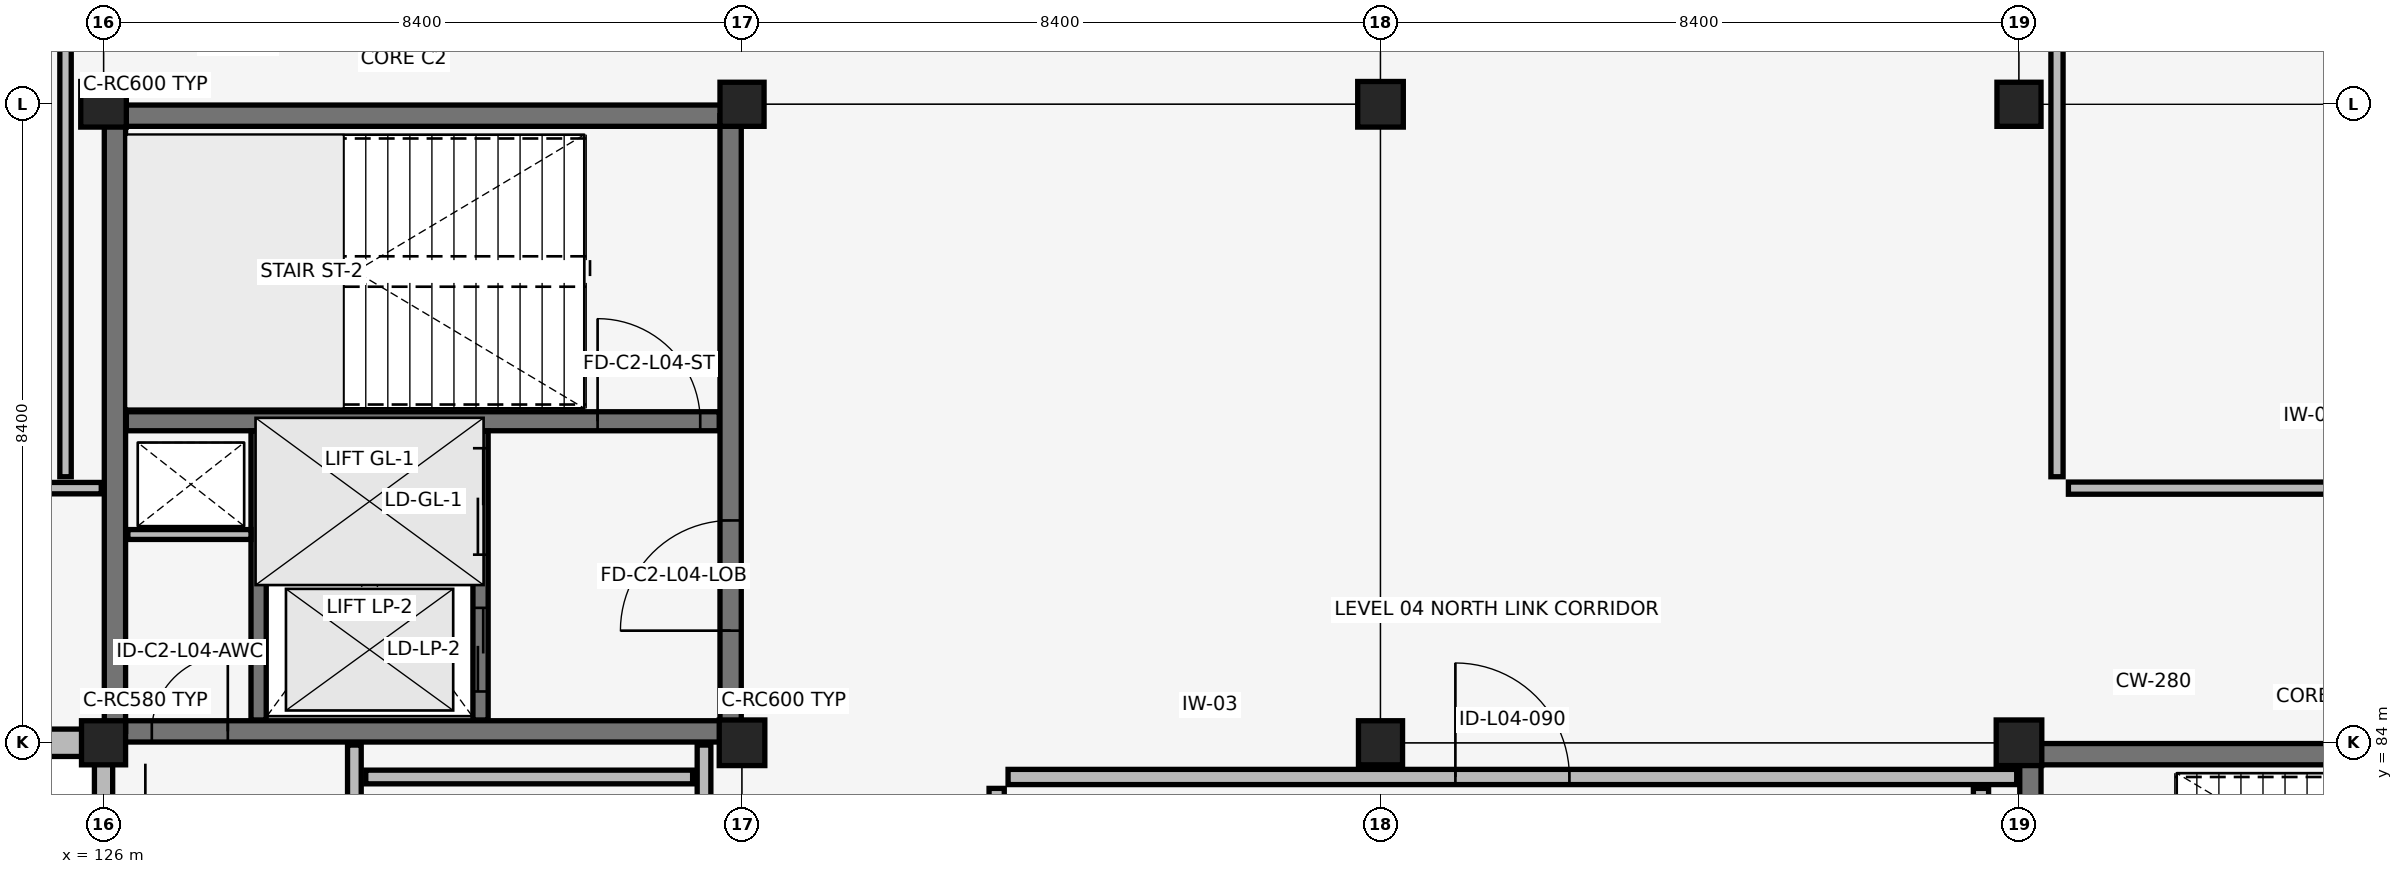
"""IFC4 building model, lengths in metres.
Left out: names, types, materials, properties, quantities, classifications, styles, units other than length and angle.
Written with IfcOpenShell. Run it as: python <this file> out.ifc"""

import sys

from ifc_helpers import new_model, si_unit, direction, frame, frame_2d, origin, origin_2d, place, context, subcontext, project, spatial, rectangle, extrude, element, fill, save


model = new_model("IFC4")
c1 = context("Model", 3, precision=1e-05, world=origin(), true_north=direction((0.0, 1.0)))
c2 = subcontext(c1, "Body", "Model", "MODEL_VIEW")
j1 = project(units=[si_unit("LENGTHUNIT", "METRE"), si_unit("PLANEANGLEUNIT", "RADIAN")], contexts=[c1])
p1 = place(None, origin())
s1 = spatial("IfcSite", under=j1, at=p1, CompositionType="ELEMENT")
p2 = place(p1, origin())
s2 = spatial("IfcBuilding", under=s1, at=p2, CompositionType="ELEMENT")
p3 = place(p2, frame((0.0, 0.0, 18.02)))
s3 = spatial("IfcBuildingStorey", under=s2, at=p3, CompositionType="ELEMENT", Elevation=18.02)
p4 = place(p3, frame((126.15, 84.15, 0.0), z_axis=(0.0, 0.0, 1.0), x_axis=(1.0, 0.0, 0.0)))
e1 = element("IfcWall", 1, at=p4, inside=s3, PredefinedType="SHEAR", context=c2, shape_type="SweptSolid", body=[
    extrude(rectangle(XDim=8.1, YDim=0.28, at=frame_2d((4.05, 0.0))), origin(), (0.0, 0.0, 1.0), 3.78),
])
p5 = place(p4, frame((0.485, 0.0, 0.0)))
e2 = element("IfcOpeningElement", 2, at=p5, cuts=e1, PredefinedType="OPENING", context=c2, shape_type="SweptSolid", body=[
    extrude(rectangle(XDim=1.0, YDim=2.15, at=frame_2d((0.5, 1.075))), frame((0.0, 0.15, 0.0), z_axis=(0.0, -1.0, 0.0), x_axis=(1.0, 0.0, 0.0)), (0.0, 0.0, 1.0), 0.3),
])
for number, where, z_axis, x_axis in (
    (3, (126.15, 92.25, 0.0), (0.0, 0.0, 1.0), (1.0, 0.0, 0.0)),
    (4, (126.15, 84.15, 0.0), (0.0, 0.0, 1.0), (0.0, 1.0, 0.0)),
):
    element("IfcWall", number, at=place(p3, frame(where, z_axis=z_axis, x_axis=x_axis)), inside=s3, PredefinedType="SHEAR", context=c2, shape_type="SweptSolid", body=[
        extrude(rectangle(XDim=8.1, YDim=0.28, at=frame_2d((4.05, 0.0))), origin(), (0.0, 0.0, 1.0), 3.78),
    ])
p6 = place(p3, frame((134.25, 84.15, 0.0), z_axis=(0.0, 0.0, 1.0), x_axis=(0.0, 1.0, 0.0)))
e5 = element("IfcWall", 5, at=p6, inside=s3, PredefinedType="SHEAR", context=c2, shape_type="SweptSolid", body=[
    extrude(rectangle(XDim=8.1, YDim=0.28, at=frame_2d((4.05, 0.0))), origin(), (0.0, 0.0, 1.0), 3.78),
])
p7 = place(p6, frame((1.325, 0.0, 0.0)))
e6 = element("IfcOpeningElement", 6, at=p7, cuts=e5, PredefinedType="OPENING", context=c2, shape_type="SweptSolid", body=[
    extrude(rectangle(XDim=1.45, YDim=2.15, at=frame_2d((0.725, 1.075))), frame((0.0, 0.15, 0.0), z_axis=(0.0, -1.0, 0.0), x_axis=(1.0, 0.0, 0.0)), (0.0, 0.0, 1.0), 0.3),
])
p8 = place(p3, frame((126.3, 88.23, 0.0), z_axis=(0.0, 0.0, 1.0), x_axis=(1.0, 0.0, 0.0)))
e7 = element("IfcWall", 7, at=p8, inside=s3, PredefinedType="SHEAR", context=c2, shape_type="SweptSolid", body=[
    extrude(rectangle(XDim=7.8, YDim=0.25, at=frame_2d((3.9, 0.0))), origin(), (0.0, 0.0, 1.0), 3.78),
])
p9 = place(p8, frame((6.2, 0.0, 0.0)))
e8 = element("IfcOpeningElement", 8, at=p9, cuts=e7, PredefinedType="OPENING", context=c2, shape_type="SweptSolid", body=[
    extrude(rectangle(XDim=1.35, YDim=2.15, at=frame_2d((0.675, 1.075))), frame((0.0, 0.135, 0.0), z_axis=(0.0, -1.0, 0.0), x_axis=(1.0, 0.0, 0.0)), (0.0, 0.0, 1.0), 0.27),
])
p10 = place(p3, frame((151.35, 83.85, 0.0), z_axis=(0.0, 0.0, 1.0), x_axis=(1.0, 0.0, 0.0)))
e9 = element("IfcWall", 9, at=p10, inside=s3, PredefinedType="SHEAR", context=c2, shape_type="SweptSolid", body=[
    extrude(rectangle(XDim=8.1, YDim=0.28, at=frame_2d((4.05, 0.0))), origin(), (0.0, 0.0, 1.0), 3.78),
])
p11 = place(p3, frame((151.35, 75.75, 0.0), z_axis=(0.0, 0.0, 1.0), x_axis=(0.0, 1.0, 0.0)))
e10 = element("IfcWall", 10, at=p11, inside=s3, PredefinedType="SHEAR", context=c2, shape_type="SweptSolid", body=[
    extrude(rectangle(XDim=8.1, YDim=0.28, at=frame_2d((4.05, 0.0))), origin(), (0.0, 0.0, 1.0), 3.78),
])
p12 = place(p11, frame((1.325, 0.0, 0.0)))
e11 = element("IfcOpeningElement", 11, at=p12, cuts=e10, PredefinedType="OPENING", context=c2, shape_type="SweptSolid", body=[
    extrude(rectangle(XDim=1.45, YDim=2.15, at=frame_2d((0.725, 1.075))), frame((0.0, 0.15, 0.0), z_axis=(0.0, -1.0, 0.0), x_axis=(1.0, 0.0, 0.0)), (0.0, 0.0, 1.0), 0.3),
])
p13 = place(p3, frame((126.0, 84.0, 0.0), z_axis=(0.0, 0.0, 1.0), x_axis=(1.0, 0.0, 0.0)))
e12 = element("IfcColumn", 12, at=p13, inside=s3, PredefinedType="COLUMN", context=c2, shape_type="SweptSolid", body=[
    extrude(rectangle(XDim=0.58, YDim=0.58, at=origin_2d()), origin(), (0.0, 0.0, 1.0), 3.78),
])
for number, where, z_axis, x_axis in (
    (13, (126.0, 92.4, 0.0), (0.0, 0.0, 1.0), (1.0, 0.0, 0.0)),
    (14, (134.4, 84.0, 0.0), (0.0, 0.0, 1.0), (1.0, 0.0, 0.0)),
):
    element("IfcColumn", number, at=place(p3, frame(where, z_axis=z_axis, x_axis=x_axis)), inside=s3, PredefinedType="COLUMN", context=c2, shape_type="SweptSolid", body=[
        extrude(rectangle(XDim=0.6, YDim=0.6, at=origin_2d()), origin(), (0.0, 0.0, 1.0), 3.78),
    ])
for number, where, z_axis, x_axis in (
    (15, (134.4, 92.4, 0.0), (0.0, 0.0, 1.0), (1.0, 0.0, 0.0)),
    (16, (142.8, 84.0, 0.0), (0.0, 0.0, 1.0), (1.0, 0.0, 0.0)),
):
    element("IfcColumn", number, at=place(p3, frame(where, z_axis=z_axis, x_axis=x_axis)), inside=s3, PredefinedType="COLUMN", context=c2, shape_type="SweptSolid", body=[
        extrude(rectangle(XDim=0.58, YDim=0.58, at=origin_2d()), origin(), (0.0, 0.0, 1.0), 3.78),
    ])
for number, where, z_axis, x_axis in (
    (17, (142.8, 92.4, 0.0), (0.0, 0.0, 1.0), (1.0, 0.0, 0.0)),
    (18, (151.2, 84.0, 0.0), (0.0, 0.0, 1.0), (1.0, 0.0, 0.0)),
):
    element("IfcColumn", number, at=place(p3, frame(where, z_axis=z_axis, x_axis=x_axis)), inside=s3, PredefinedType="COLUMN", context=c2, shape_type="SweptSolid", body=[
        extrude(rectangle(XDim=0.6, YDim=0.6, at=origin_2d()), origin(), (0.0, 0.0, 1.0), 3.78),
    ])
p14 = place(p3, frame((151.2, 92.4, 0.0), z_axis=(0.0, 0.0, 1.0), x_axis=(1.0, 0.0, 0.0)))
e19 = element("IfcColumn", 19, at=p14, inside=s3, PredefinedType="COLUMN", context=c2, shape_type="SweptSolid", body=[
    extrude(rectangle(XDim=0.58, YDim=0.58, at=origin_2d()), origin(), (0.0, 0.0, 1.0), 3.78),
])
p15 = place(p3, frame((117.81, 84.0, 0.0), z_axis=(0.0, 0.0, 1.0), x_axis=(1.0, 0.0, 0.0)))
e20 = element("IfcWall", 20, at=p15, inside=s3, PredefinedType="SOLIDWALL", context=c2, shape_type="SweptSolid", body=[
    extrude(rectangle(XDim=7.915, YDim=0.36, at=frame_2d((3.958, 0.0))), origin(), (0.0, 0.0, 1.0), 3.78),
])
p16 = place(p15, frame((0.984, 0.0, 0.75)))
e21 = element("IfcOpeningElement", 21, at=p16, cuts=e20, PredefinedType="OPENING", context=c2, shape_type="SweptSolid", body=[
    extrude(rectangle(XDim=1.04, YDim=2.6, at=frame_2d((0.52, 1.3))), frame((0.0, 0.19, 0.0), z_axis=(0.0, -1.0, 0.0), x_axis=(1.0, 0.0, 0.0)), (0.0, 0.0, 1.0), 0.38),
])
p17 = place(p15, frame((2.567, 0.0, 0.75)))
e22 = element("IfcOpeningElement", 22, at=p17, cuts=e20, PredefinedType="OPENING", context=c2, shape_type="SweptSolid", body=[
    extrude(rectangle(XDim=1.04, YDim=2.6, at=frame_2d((0.52, 1.3))), frame((0.0, 0.19, 0.0), z_axis=(0.0, -1.0, 0.0), x_axis=(1.0, 0.0, 0.0)), (0.0, 0.0, 1.0), 0.38),
])
p18 = place(p15, frame((4.308, 0.0, 0.75)))
e23 = element("IfcOpeningElement", 23, at=p18, cuts=e20, PredefinedType="OPENING", context=c2, shape_type="SweptSolid", body=[
    extrude(rectangle(XDim=1.04, YDim=2.6, at=frame_2d((0.52, 1.3))), frame((0.0, 0.19, 0.0), z_axis=(0.0, -1.0, 0.0), x_axis=(1.0, 0.0, 0.0)), (0.0, 0.0, 1.0), 0.38),
])
p19 = place(p15, frame((5.891, 0.0, 0.75)))
e24 = element("IfcOpeningElement", 24, at=p19, cuts=e20, PredefinedType="OPENING", context=c2, shape_type="SweptSolid", body=[
    extrude(rectangle(XDim=1.04, YDim=2.6, at=frame_2d((0.52, 1.3))), frame((0.0, 0.19, 0.0), z_axis=(0.0, -1.0, 0.0), x_axis=(1.0, 0.0, 0.0)), (0.0, 0.0, 1.0), 0.38),
])
p20 = place(p3, frame((126.0, 75.885, 0.0), z_axis=(0.0, 0.0, 1.0), x_axis=(0.0, 1.0, 0.0)))
e25 = element("IfcWall", 25, at=p20, inside=s3, PredefinedType="SOLIDWALL", context=c2, shape_type="SweptSolid", body=[
    extrude(rectangle(XDim=7.84, YDim=0.24, at=frame_2d((3.92, 0.0))), origin(), (0.0, 0.0, 1.0), 3.18),
])
p21 = place(p20, frame((0.804, 0.0, 0.35)))
e26 = element("IfcOpeningElement", 26, at=p21, cuts=e25, PredefinedType="OPENING", context=c2, shape_type="SweptSolid", body=[
    extrude(rectangle(XDim=0.44, YDim=1.25, at=frame_2d((0.22, 0.625))), frame((0.0, 0.13, 0.0), z_axis=(0.0, -1.0, 0.0), x_axis=(1.0, 0.0, 0.0)), (0.0, 0.0, 1.0), 0.26),
])
p22 = place(p20, frame((2.252, 0.0, 0.35)))
e27 = element("IfcOpeningElement", 27, at=p22, cuts=e25, PredefinedType="OPENING", context=c2, shape_type="SweptSolid", body=[
    extrude(rectangle(XDim=0.44, YDim=1.25, at=frame_2d((0.22, 0.625))), frame((0.0, 0.13, 0.0), z_axis=(0.0, -1.0, 0.0), x_axis=(1.0, 0.0, 0.0)), (0.0, 0.0, 1.0), 0.26),
])
p23 = place(p20, frame((3.7, 0.0, 0.35)))
e28 = element("IfcOpeningElement", 28, at=p23, cuts=e25, PredefinedType="OPENING", context=c2, shape_type="SweptSolid", body=[
    extrude(rectangle(XDim=0.44, YDim=1.25, at=frame_2d((0.22, 0.625))), frame((0.0, 0.13, 0.0), z_axis=(0.0, -1.0, 0.0), x_axis=(1.0, 0.0, 0.0)), (0.0, 0.0, 1.0), 0.26),
])
p24 = place(p20, frame((5.148, 0.0, 0.35)))
e29 = element("IfcOpeningElement", 29, at=p24, cuts=e25, PredefinedType="OPENING", context=c2, shape_type="SweptSolid", body=[
    extrude(rectangle(XDim=0.44, YDim=1.25, at=frame_2d((0.22, 0.625))), frame((0.0, 0.13, 0.0), z_axis=(0.0, -1.0, 0.0), x_axis=(1.0, 0.0, 0.0)), (0.0, 0.0, 1.0), 0.26),
])
p25 = place(p20, frame((6.596, 0.0, 0.35)))
e30 = element("IfcOpeningElement", 30, at=p25, cuts=e25, PredefinedType="OPENING", context=c2, shape_type="SweptSolid", body=[
    extrude(rectangle(XDim=0.44, YDim=1.25, at=frame_2d((0.22, 0.625))), frame((0.0, 0.13, 0.0), z_axis=(0.0, -1.0, 0.0), x_axis=(1.0, 0.0, 0.0)), (0.0, 0.0, 1.0), 0.26),
])
p26 = place(p3, frame((130.96, 84.3, 0.0), z_axis=(0.0, 0.0, 1.0), x_axis=(0.0, 1.0, 0.0)))
e31 = element("IfcWall", 31, at=p26, inside=s3, PredefinedType="SHEAR", context=c2, shape_type="SweptSolid", body=[
    extrude(rectangle(XDim=3.8, YDim=0.2, at=frame_2d((1.9, 0.0))), origin(), (0.0, 0.0, 1.0), 3.08),
])
p27 = place(p26, frame((0.375, 0.0, 0.0)))
e32 = element("IfcOpeningElement", 32, at=p27, cuts=e31, PredefinedType="OPENING", context=c2, shape_type="SweptSolid", body=[
    extrude(rectangle(XDim=1.1, YDim=2.15, at=frame_2d((0.55, 1.075))), frame((0.0, 0.11, 0.0), z_axis=(0.0, -1.0, 0.0), x_axis=(1.0, 0.0, 0.0)), (0.0, 0.0, 1.0), 0.22),
])
p28 = place(p26, frame((2.175, 0.0, 0.0)))
e33 = element("IfcOpeningElement", 33, at=p28, cuts=e31, PredefinedType="OPENING", context=c2, shape_type="SweptSolid", body=[
    extrude(rectangle(XDim=1.4, YDim=2.2, at=frame_2d((0.7, 1.1))), frame((0.0, 0.11, 0.0), z_axis=(0.0, -1.0, 0.0), x_axis=(1.0, 0.0, 0.0)), (0.0, 0.0, 1.0), 0.22),
])
p29 = place(p3, frame((128.04, 84.3, 0.0), z_axis=(0.0, 0.0, 1.0), x_axis=(0.0, 1.0, 0.0)))
e34 = element("IfcWall", 34, at=p29, inside=s3, PredefinedType="SHEAR", context=c2, shape_type="SweptSolid", body=[
    extrude(rectangle(XDim=3.8, YDim=0.2, at=frame_2d((1.9, 0.0))), origin(), (0.0, 0.0, 1.0), 3.08),
])
p30 = place(p3, frame((128.15, 86.2, 0.0), z_axis=(0.0, 0.0, 1.0), x_axis=(1.0, 0.0, 0.0)))
e35 = element("IfcWall", 35, at=p30, inside=s3, PredefinedType="SHEAR", context=c2, shape_type="SweptSolid", body=[
    extrude(rectangle(XDim=2.7, YDim=0.18, at=frame_2d((1.35, 0.0))), origin(), (0.0, 0.0, 1.0), 3.78),
])
p31 = place(p3, frame((126.32, 86.74, 0.0), z_axis=(0.0, 0.0, 1.0), x_axis=(1.0, 0.0, 0.0)))
e36 = element("IfcWall", 36, at=p31, inside=s3, PredefinedType="PARTITIONING", context=c2, shape_type="SweptSolid", body=[
    extrude(rectangle(XDim=1.62, YDim=0.13, at=frame_2d((0.81, 0.0))), origin(), (0.0, 0.0, 1.0), 3.78),
])
p32 = place(p3, frame((129.45, 83.55, 0.0), z_axis=(0.0, 0.0, 1.0), x_axis=(1.0, 0.0, 0.0)))
e37 = element("IfcWall", 37, at=p32, inside=s3, PredefinedType="PARTITIONING", context=c2, shape_type="SweptSolid", body=[
    extrude(rectangle(XDim=4.3, YDim=0.18, at=frame_2d((2.15, 0.0))), origin(), (0.0, 0.0, 1.0), 3.78),
])
for number, where, z_axis, x_axis in (
    (38, (129.3, 36.7, 0.0), (0.0, 0.0, 1.0), (0.0, 1.0, 0.0)),
    (39, (133.9, 36.7, 0.0), (0.0, 0.0, 1.0), (0.0, 1.0, 0.0)),
):
    element("IfcWall", number, at=place(p3, frame(where, z_axis=z_axis, x_axis=x_axis)), inside=s3, PredefinedType="PARTITIONING", context=c2, shape_type="SweptSolid", body=[
        extrude(rectangle(XDim=47.27, YDim=0.18, at=frame_2d((23.635, 0.0))), origin(), (0.0, 0.0, 1.0), 3.08),
    ])
p33 = place(p3, frame((151.85, 87.35, 0.0), z_axis=(0.0, 0.0, 1.0), x_axis=(1.0, 0.0, 0.0)))
e40 = element("IfcWall", 40, at=p33, inside=s3, PredefinedType="PARTITIONING", context=c2, shape_type="SweptSolid", body=[
    extrude(rectangle(XDim=15.97, YDim=0.16, at=frame_2d((7.985, 0.0))), origin(), (0.0, 0.0, 1.0), 3.18),
])
p34 = place(p33, frame((7.335, 0.0, 0.0)))
e41 = element("IfcOpeningElement", 41, at=p34, cuts=e40, PredefinedType="OPENING", context=c2, shape_type="SweptSolid", body=[
    extrude(rectangle(XDim=1.3, YDim=2.2, at=frame_2d((0.65, 1.1))), frame((0.0, 0.09, 0.0), z_axis=(0.0, -1.0, 0.0), x_axis=(1.0, 0.0, 0.0)), (0.0, 0.0, 1.0), 0.18),
])
p35 = place(p3, frame((151.7, 87.5, 0.0), z_axis=(0.0, 0.0, 1.0), x_axis=(0.0, 1.0, 0.0)))
e42 = element("IfcWall", 42, at=p35, inside=s3, PredefinedType="PARTITIONING", context=c2, shape_type="SweptSolid", body=[
    extrude(rectangle(XDim=29.92, YDim=0.16, at=frame_2d((14.96, 0.0))), origin(), (0.0, 0.0, 1.0), 3.16),
])
p36 = place(p3, frame((109.23, 87.35, 0.0), z_axis=(0.0, 0.0, 1.0), x_axis=(1.0, 0.0, 0.0)))
e43 = element("IfcWall", 43, at=p36, inside=s3, PredefinedType="PARTITIONING", context=c2, shape_type="SweptSolid", body=[
    extrude(rectangle(XDim=16.74, YDim=0.15, at=frame_2d((8.37, 0.0))), origin(), (0.0, 0.0, 1.0), 3.18),
])
p37 = place(p36, frame((7.845, 0.0, 0.0)))
e44 = element("IfcOpeningElement", 44, at=p37, cuts=e43, PredefinedType="OPENING", context=c2, shape_type="SweptSolid", body=[
    extrude(rectangle(XDim=1.05, YDim=2.15, at=frame_2d((0.525, 1.075))), frame((0.0, 0.085, 0.0), z_axis=(0.0, -1.0, 0.0), x_axis=(1.0, 0.0, 0.0)), (0.0, 0.0, 1.0), 0.17),
])
p38 = place(p3, frame((125.5, 87.5, 0.0), z_axis=(0.0, 0.0, 1.0), x_axis=(0.0, 1.0, 0.0)))
e45 = element("IfcWall", 45, at=p38, inside=s3, PredefinedType="PARTITIONING", context=c2, shape_type="SweptSolid", body=[
    extrude(rectangle(XDim=29.92, YDim=0.15, at=frame_2d((14.96, 0.0))), origin(), (0.0, 0.0, 1.0), 3.78),
])
p39 = place(p3, frame((137.9, 83.55, 0.0), z_axis=(0.0, 0.0, 1.0), x_axis=(1.0, 0.0, 0.0)))
e46 = element("IfcWall", 46, at=p39, inside=s3, PredefinedType="PARTITIONING", context=c2, shape_type="SweptSolid", body=[
    extrude(rectangle(XDim=13.27, YDim=0.2, at=frame_2d((6.635, 0.0))), origin(), (0.0, 0.0, 1.0), 3.13),
])
p40 = place(p39, frame((5.885, 0.0, 0.0)))
e47 = element("IfcOpeningElement", 47, at=p40, cuts=e46, PredefinedType="OPENING", context=c2, shape_type="SweptSolid", body=[
    extrude(rectangle(XDim=1.5, YDim=2.2, at=frame_2d((0.75, 1.1))), frame((0.0, 0.11, 0.0), z_axis=(0.0, -1.0, 0.0), x_axis=(1.0, 0.0, 0.0)), (0.0, 0.0, 1.0), 0.22),
])
for number, where, z_axis, x_axis in (
    (48, (137.75, 67.8, 0.0), (0.0, 0.0, 1.0), (0.0, 1.0, 0.0)),
    (49, (150.7, 67.8, 0.0), (0.0, 0.0, 1.0), (0.0, 1.0, 0.0)),
):
    element("IfcWall", number, at=place(p3, frame(where, z_axis=z_axis, x_axis=x_axis)), inside=s3, PredefinedType="PARTITIONING", context=c2, shape_type="SweptSolid", body=[
        extrude(rectangle(XDim=15.6, YDim=0.2, at=frame_2d((7.8, 0.0))), origin(), (0.0, 0.0, 1.0), 3.16),
    ])
p41 = place(p9, origin())
e50 = element("IfcDoor", 50, at=p41, inside=s3, OperationType="SINGLE_SWING_LEFT", PredefinedType="DOOR", context=c2, shape_type="SweptSolid", body=[
    extrude(rectangle(XDim=1.35, YDim=2.15, at=frame_2d((0.675, 1.075))), frame((0.0, 0.025, 0.0), z_axis=(0.0, -1.0, 0.0), x_axis=(1.0, 0.0, 0.0)), (0.0, 0.0, 1.0), 0.05),
])
fill(e8, e50)
p42 = place(p27, origin())
e51 = element("IfcDoor", 51, at=p42, inside=s3, OperationType="SLIDING_TO_LEFT", PredefinedType="DOOR", context=c2, shape_type="SweptSolid", body=[
    extrude(rectangle(XDim=1.1, YDim=2.15, at=frame_2d((0.55, 1.075))), frame((0.0, 0.025, 0.0), z_axis=(0.0, -1.0, 0.0), x_axis=(1.0, 0.0, 0.0)), (0.0, 0.0, 1.0), 0.05),
])
fill(e32, e51)
p43 = place(p28, origin())
e52 = element("IfcDoor", 52, at=p43, inside=s3, OperationType="SLIDING_TO_LEFT", PredefinedType="DOOR", context=c2, shape_type="SweptSolid", body=[
    extrude(rectangle(XDim=1.4, YDim=2.2, at=frame_2d((0.7, 1.1))), frame((0.0, 0.025, 0.0), z_axis=(0.0, -1.0, 0.0), x_axis=(1.0, 0.0, 0.0)), (0.0, 0.0, 1.0), 0.05),
])
fill(e33, e52)
p44 = place(p7, origin())
e53 = element("IfcDoor", 53, at=p44, inside=s3, OperationType="DOUBLE_DOOR_SINGLE_SWING", PredefinedType="DOOR", context=c2, shape_type="SweptSolid", body=[
    extrude(rectangle(XDim=1.45, YDim=2.15, at=frame_2d((0.725, 1.075))), frame((0.0, 0.025, 0.0), z_axis=(0.0, -1.0, 0.0), x_axis=(1.0, 0.0, 0.0)), (0.0, 0.0, 1.0), 0.05),
])
fill(e6, e53)
p45 = place(p5, origin())
e54 = element("IfcDoor", 54, at=p45, inside=s3, OperationType="SINGLE_SWING_RIGHT", PredefinedType="DOOR", context=c2, shape_type="SweptSolid", body=[
    extrude(rectangle(XDim=1.0, YDim=2.15, at=frame_2d((0.5, 1.075))), frame((0.0, 0.025, 0.0), z_axis=(0.0, -1.0, 0.0), x_axis=(1.0, 0.0, 0.0)), (0.0, 0.0, 1.0), 0.05),
])
fill(e2, e54)
p46 = place(p40, origin())
e55 = element("IfcDoor", 55, at=p46, inside=s3, OperationType="DOUBLE_DOOR_SINGLE_SWING", PredefinedType="DOOR", context=c2, shape_type="SweptSolid", body=[
    extrude(rectangle(XDim=1.5, YDim=2.2, at=frame_2d((0.75, 1.1))), frame((0.0, 0.025, 0.0), z_axis=(0.0, -1.0, 0.0), x_axis=(1.0, 0.0, 0.0)), (0.0, 0.0, 1.0), 0.05),
])
fill(e47, e55)
save(model, sys.argv[1])
